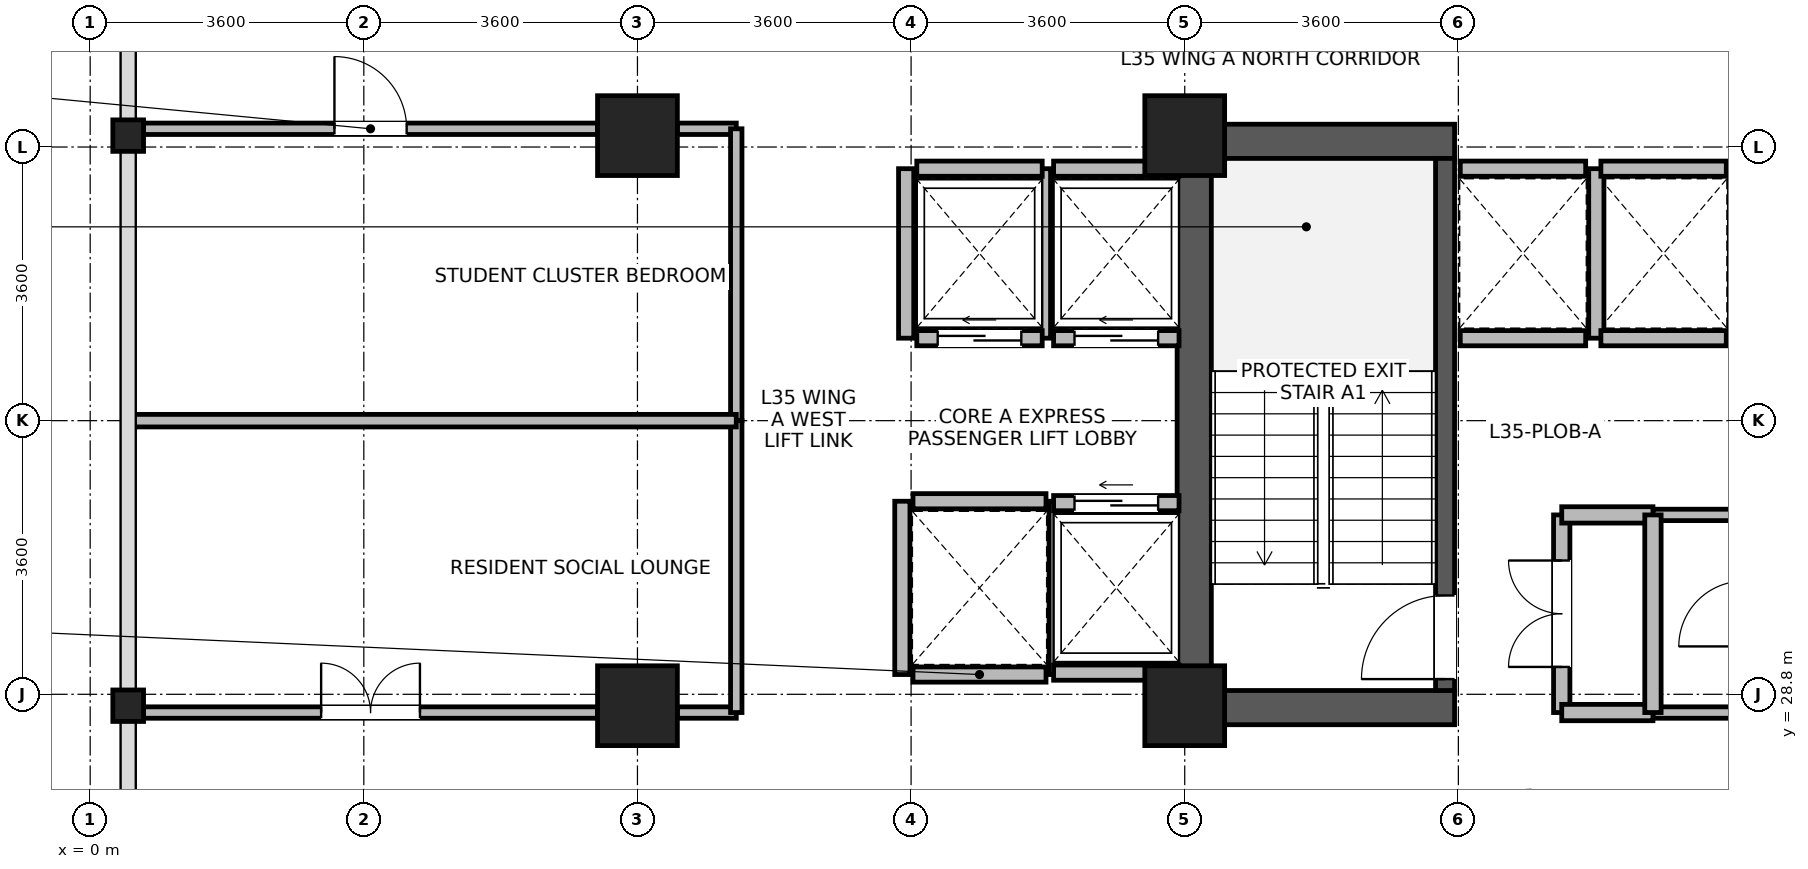
"""IFC4 building model, lengths in metres.
Left out: names, types, materials, properties, quantities, classifications, styles, units other than length and angle.
Written with IfcOpenShell. Run it as: python <this file> out.ifc"""

import sys

from ifc_helpers import new_model, si_unit, direction, frame, frame_2d, origin, origin_2d, place, context, subcontext, project, spatial, rectangle, i_section, extrude, source, transform, mapped, element, fill, save


model = new_model("IFC4")
c1 = context("Model", 3, precision=1e-05, world=origin(), true_north=direction((0.0, 1.0)))
c2 = subcontext(c1, "Body", "Model", "MODEL_VIEW")
j1 = project(units=[si_unit("LENGTHUNIT", "METRE"), si_unit("PLANEANGLEUNIT", "RADIAN")], contexts=[c1])
p1 = place(None, origin())
s1 = spatial("IfcSite", under=j1, at=p1, CompositionType="ELEMENT")
p2 = place(p1, origin())
s2 = spatial("IfcBuilding", under=s1, at=p2, CompositionType="ELEMENT")
p3 = place(p2, frame((0.0, 0.0, 140.2)))
s3 = spatial("IfcBuildingStorey", under=s2, at=p3, CompositionType="ELEMENT", Elevation=140.2)
p4 = place(p3, frame((14.525, 28.4, 0.0), z_axis=(0.0, 0.0, 1.0), x_axis=(0.0, 1.0, 0.0)))
e1 = element("IfcWall", 1, at=p4, inside=s3, PredefinedType="SHEAR", context=c2, shape_type="SweptSolid", body=[
    extrude(rectangle(XDim=7.9, YDim=0.45, at=frame_2d((3.95, 0.0))), origin(), (0.0, 0.0, 1.0), 3.46),
])
for number, where, z_axis, x_axis in (
    (2, (14.75, 28.625, 0.0), (0.0, 0.0, 1.0), (1.0, 0.0, 0.0)),
    (3, (14.75, 36.075, 0.0), (0.0, 0.0, 1.0), (1.0, 0.0, 0.0)),
):
    element("IfcWall", number, at=place(p3, frame(where, z_axis=z_axis, x_axis=x_axis)), inside=s3, PredefinedType="SHEAR", context=c2, shape_type="SweptSolid", body=[
        extrude(rectangle(XDim=3.2, YDim=0.45, at=frame_2d((1.6, 0.0))), origin(), (0.0, 0.0, 1.0), 3.46),
    ])
p5 = place(p3, frame((17.825, 28.85, 0.0), z_axis=(0.0, 0.0, 1.0), x_axis=(0.0, 1.0, 0.0)))
e4 = element("IfcWall", 4, at=p5, inside=s3, PredefinedType="SHEAR", context=c2, shape_type="SweptSolid", body=[
    extrude(rectangle(XDim=7.0, YDim=0.25, at=frame_2d((3.5, 0.0))), origin(), (0.0, 0.0, 1.0), 3.46),
])
p6 = place(p5, frame((0.15, 0.0, 0.0)))
e5 = element("IfcOpeningElement", 5, at=p6, cuts=e4, PredefinedType="OPENING", context=c2, shape_type="SweptSolid", body=[
    extrude(rectangle(XDim=1.1, YDim=2.08, at=frame_2d((0.55, 1.04))), frame((0.0, 0.135, 0.0), z_axis=(0.0, -1.0, 0.0), x_axis=(1.0, 0.0, 0.0)), (0.0, 0.0, 1.0), 0.27),
])
m1 = source(origin(), c2, "Body", "SweptSolid", [
    extrude(rectangle(XDim=1.05, YDim=1.05, at=origin_2d()), origin(), (0.0, 0.0, 1.0), 3.7),
])
for number, where, z_axis, x_axis in (
    (6, (7.2, 28.65, 0.0), (0.0, 0.0, 1.0), (1.0, 0.0, 0.0)),
    (7, (7.2, 36.15, 0.0), (0.0, 0.0, 1.0), (1.0, 0.0, 0.0)),
    (8, (14.4, 28.65, 0.0), (0.0, 0.0, 1.0), (1.0, 0.0, 0.0)),
    (9, (14.4, 36.15, 0.0), (0.0, 0.0, 1.0), (1.0, 0.0, 0.0)),
):
    element("IfcColumn", number, at=place(p3, frame(where, z_axis=z_axis, x_axis=x_axis)), inside=s3, PredefinedType="COLUMN", context=c2, shape_type="MappedRepresentation", body=[
        mapped(m1, transform((0.0, 0.0, 0.0), x_axis=(1.0, 0.0, 0.0), y_axis=(0.0, 1.0, 0.0), z_axis=(0.0, 0.0, 1.0), scale=1.0)),
    ])
m2 = source(origin(), c2, "Body", "SweptSolid", [
    extrude(i_section(OverallWidth=0.404, OverallDepth=0.414, WebThickness=0.021, FlangeThickness=0.028, FilletRadius=0.015, at=origin_2d()), origin(), (0.0, 0.0, 1.0), 3.7),
])
for number, where, z_axis, x_axis in (
    (10, (0.5, 28.65, 0.0), (0.0, 0.0, 1.0), (1.0, 0.0, 0.0)),
    (11, (0.5, 36.15, 0.0), (0.0, 0.0, 1.0), (1.0, 0.0, 0.0)),
):
    element("IfcColumn", number, at=place(p3, frame(where, z_axis=z_axis, x_axis=x_axis)), inside=s3, PredefinedType="COLUMN", context=c2, shape_type="MappedRepresentation", body=[
        mapped(m2, transform((0.0, 0.0, 0.0), x_axis=(1.0, 0.0, 0.0), y_axis=(0.0, 1.0, 0.0), z_axis=(0.0, 0.0, 1.0), scale=1.0)),
    ])
p7 = place(p3, frame((18.025, 33.485, 0.0), z_axis=(0.0, 0.0, 1.0), x_axis=(1.0, 0.0, 0.0)))
e12 = element("IfcWall", 12, at=p7, inside=s3, PredefinedType="PARTITIONING", context=c2, shape_type="SweptSolid", body=[
    extrude(rectangle(XDim=1.65, YDim=0.2, at=frame_2d((0.825, 0.0))), origin(), (0.0, 0.0, 1.0), 3.44),
])
p8 = place(p3, frame((18.025, 35.715, 0.0), z_axis=(0.0, 0.0, 1.0), x_axis=(1.0, 0.0, 0.0)))
e13 = element("IfcWall", 13, at=p8, inside=s3, PredefinedType="PARTITIONING", context=c2, shape_type="SweptSolid", body=[
    extrude(rectangle(XDim=1.65, YDim=0.2, at=frame_2d((0.825, 0.0))), origin(), (0.0, 0.0, 1.0), 2.44),
])
p9 = place(p3, frame((19.815, 33.485, 0.0), z_axis=(0.0, 0.0, 1.0), x_axis=(0.0, 1.0, 0.0)))
e14 = element("IfcWall", 14, at=p9, inside=s3, PredefinedType="PARTITIONING", context=c2, shape_type="SweptSolid", body=[
    extrude(rectangle(XDim=2.23, YDim=0.2, at=frame_2d((1.115, 0.0))), origin(), (0.0, 0.0, 1.0), 3.44),
])
p10 = place(p3, frame((19.875, 33.485, 0.0), z_axis=(0.0, 0.0, 1.0), x_axis=(1.0, 0.0, 0.0)))
e15 = element("IfcWall", 15, at=p10, inside=s3, PredefinedType="PARTITIONING", context=c2, shape_type="SweptSolid", body=[
    extrude(rectangle(XDim=1.65, YDim=0.2, at=frame_2d((0.825, 0.0))), origin(), (0.0, 0.0, 1.0), 3.44),
])
p11 = place(p3, frame((19.875, 35.715, 0.0), z_axis=(0.0, 0.0, 1.0), x_axis=(1.0, 0.0, 0.0)))
e16 = element("IfcWall", 16, at=p11, inside=s3, PredefinedType="PARTITIONING", context=c2, shape_type="SweptSolid", body=[
    extrude(rectangle(XDim=1.65, YDim=0.2, at=frame_2d((0.825, 0.0))), origin(), (0.0, 0.0, 1.0), 2.44),
])
for number, where, z_axis, x_axis in (
    (17, (10.825, 29.06, 0.0), (0.0, 0.0, 1.0), (1.0, 0.0, 0.0)),
    (18, (10.825, 31.34, 0.0), (0.0, 0.0, 1.0), (1.0, 0.0, 0.0)),
):
    element("IfcWall", number, at=place(p3, frame(where, z_axis=z_axis, x_axis=x_axis)), inside=s3, PredefinedType="PARTITIONING", context=c2, shape_type="SweptSolid", body=[
        extrude(rectangle(XDim=1.75, YDim=0.2, at=frame_2d((0.875, 0.0))), origin(), (0.0, 0.0, 1.0), 3.44),
    ])
for number, where, z_axis, x_axis in (
    (19, (10.685, 29.06, 0.0), (0.0, 0.0, 1.0), (0.0, 1.0, 0.0)),
    (20, (12.715, 29.06, 0.0), (0.0, 0.0, 1.0), (0.0, 1.0, 0.0)),
):
    element("IfcWall", number, at=place(p3, frame(where, z_axis=z_axis, x_axis=x_axis)), inside=s3, PredefinedType="PARTITIONING", context=c2, shape_type="SweptSolid", body=[
        extrude(rectangle(XDim=2.28, YDim=0.2, at=frame_2d((1.14, 0.0))), origin(), (0.0, 0.0, 1.0), 3.44),
    ])
p12 = place(p3, frame((12.675, 33.485, 0.0), z_axis=(0.0, 0.0, 1.0), x_axis=(1.0, 0.0, 0.0)))
e21 = element("IfcWall", 21, at=p12, inside=s3, PredefinedType="PARTITIONING", context=c2, shape_type="SweptSolid", body=[
    extrude(rectangle(XDim=1.65, YDim=0.2, at=frame_2d((0.825, 0.0))), origin(), (0.0, 0.0, 1.0), 3.44),
])
p13 = place(p12, frame((0.275, 0.0, 0.0)))
e22 = element("IfcOpeningElement", 22, at=p13, cuts=e21, PredefinedType="OPENING", context=c2, shape_type="SweptSolid", body=[
    extrude(rectangle(XDim=1.1, YDim=2.12, at=frame_2d((0.55, 1.06))), frame((0.0, 0.11, 0.0), z_axis=(0.0, -1.0, 0.0), x_axis=(1.0, 0.0, 0.0)), (0.0, 0.0, 1.0), 0.22),
])
p14 = place(p3, frame((12.675, 35.715, 0.0), z_axis=(0.0, 0.0, 1.0), x_axis=(1.0, 0.0, 0.0)))
e23 = element("IfcWall", 23, at=p14, inside=s3, PredefinedType="PARTITIONING", context=c2, shape_type="SweptSolid", body=[
    extrude(rectangle(XDim=1.65, YDim=0.2, at=frame_2d((0.825, 0.0))), origin(), (0.0, 0.0, 1.0), 3.44),
])
p15 = place(p3, frame((12.535, 33.485, 0.0), z_axis=(0.0, 0.0, 1.0), x_axis=(0.0, 1.0, 0.0)))
e24 = element("IfcWall", 24, at=p15, inside=s3, PredefinedType="PARTITIONING", context=c2, shape_type="SweptSolid", body=[
    extrude(rectangle(XDim=2.23, YDim=0.2, at=frame_2d((1.115, 0.0))), origin(), (0.0, 0.0, 1.0), 3.44),
])
p16 = place(p3, frame((12.675, 29.085, 0.0), z_axis=(0.0, 0.0, 1.0), x_axis=(1.0, 0.0, 0.0)))
e25 = element("IfcWall", 25, at=p16, inside=s3, PredefinedType="PARTITIONING", context=c2, shape_type="SweptSolid", body=[
    extrude(rectangle(XDim=1.65, YDim=0.2, at=frame_2d((0.825, 0.0))), origin(), (0.0, 0.0, 1.0), 3.44),
])
p17 = place(p3, frame((12.675, 31.315, 0.0), z_axis=(0.0, 0.0, 1.0), x_axis=(1.0, 0.0, 0.0)))
e26 = element("IfcWall", 26, at=p17, inside=s3, PredefinedType="PARTITIONING", context=c2, shape_type="SweptSolid", body=[
    extrude(rectangle(XDim=1.65, YDim=0.2, at=frame_2d((0.825, 0.0))), origin(), (0.0, 0.0, 1.0), 3.44),
])
p18 = place(p17, frame((0.275, 0.0, 0.0)))
e27 = element("IfcOpeningElement", 27, at=p18, cuts=e26, PredefinedType="OPENING", context=c2, shape_type="SweptSolid", body=[
    extrude(rectangle(XDim=1.1, YDim=2.12, at=frame_2d((0.55, 1.06))), frame((0.0, 0.11, 0.0), z_axis=(0.0, -1.0, 0.0), x_axis=(1.0, 0.0, 0.0)), (0.0, 0.0, 1.0), 0.22),
])
p19 = place(p3, frame((10.875, 33.485, 0.0), z_axis=(0.0, 0.0, 1.0), x_axis=(1.0, 0.0, 0.0)))
e28 = element("IfcWall", 28, at=p19, inside=s3, PredefinedType="PARTITIONING", context=c2, shape_type="SweptSolid", body=[
    extrude(rectangle(XDim=1.65, YDim=0.2, at=frame_2d((0.825, 0.0))), origin(), (0.0, 0.0, 1.0), 3.44),
])
p20 = place(p19, frame((0.275, 0.0, 0.0)))
e29 = element("IfcOpeningElement", 29, at=p20, cuts=e28, PredefinedType="OPENING", context=c2, shape_type="SweptSolid", body=[
    extrude(rectangle(XDim=1.1, YDim=2.12, at=frame_2d((0.55, 1.06))), frame((0.0, 0.11, 0.0), z_axis=(0.0, -1.0, 0.0), x_axis=(1.0, 0.0, 0.0)), (0.0, 0.0, 1.0), 0.22),
])
p21 = place(p3, frame((10.875, 35.715, 0.0), z_axis=(0.0, 0.0, 1.0), x_axis=(1.0, 0.0, 0.0)))
e30 = element("IfcWall", 30, at=p21, inside=s3, PredefinedType="PARTITIONING", context=c2, shape_type="SweptSolid", body=[
    extrude(rectangle(XDim=1.65, YDim=0.2, at=frame_2d((0.825, 0.0))), origin(), (0.0, 0.0, 1.0), 3.44),
])
p22 = place(p3, frame((10.735, 33.485, 0.0), z_axis=(0.0, 0.0, 1.0), x_axis=(0.0, 1.0, 0.0)))
e31 = element("IfcWall", 31, at=p22, inside=s3, PredefinedType="PARTITIONING", context=c2, shape_type="SweptSolid", body=[
    extrude(rectangle(XDim=2.23, YDim=0.2, at=frame_2d((1.115, 0.0))), origin(), (0.0, 0.0, 1.0), 3.44),
])
p23 = place(p3, frame((0.702, 28.56, 0.0), z_axis=(0.0, 0.0, 1.0), x_axis=(1.0, 0.0, 0.0)))
e32 = element("IfcWall", 32, at=p23, inside=s3, PredefinedType="PARTITIONING", context=c2, shape_type="SweptSolid", body=[
    extrude(rectangle(XDim=5.973, YDim=0.15, at=frame_2d((2.987, 0.0))), origin(), (0.0, 0.0, 1.0), 2.84),
])
p24 = place(p23, frame((2.336, 0.0, 0.0)))
e33 = element("IfcOpeningElement", 33, at=p24, cuts=e32, PredefinedType="OPENING", context=c2, shape_type="SweptSolid", body=[
    extrude(rectangle(XDim=1.3, YDim=2.12, at=frame_2d((0.65, 1.06))), frame((0.0, 0.085, 0.0), z_axis=(0.0, -1.0, 0.0), x_axis=(1.0, 0.0, 0.0)), (0.0, 0.0, 1.0), 0.17),
])
p25 = place(p3, frame((7.725, 28.56, 0.0), z_axis=(0.0, 0.0, 1.0), x_axis=(1.0, 0.0, 0.0)))
e34 = element("IfcWall", 34, at=p25, inside=s3, PredefinedType="PARTITIONING", context=c2, shape_type="SweptSolid", body=[
    extrude(rectangle(XDim=0.775, YDim=0.15, at=frame_2d((0.387, 0.0))), origin(), (0.0, 0.0, 1.0), 2.84),
])
p26 = place(p3, frame((0.702, 36.24, 0.0), z_axis=(0.0, 0.0, 1.0), x_axis=(1.0, 0.0, 0.0)))
e35 = element("IfcWall", 35, at=p26, inside=s3, PredefinedType="PARTITIONING", context=c2, shape_type="SweptSolid", body=[
    extrude(rectangle(XDim=5.973, YDim=0.15, at=frame_2d((2.987, 0.0))), origin(), (0.0, 0.0, 1.0), 2.84),
])
p27 = place(p26, frame((2.511, 0.0, 0.0)))
e36 = element("IfcOpeningElement", 36, at=p27, cuts=e35, PredefinedType="OPENING", context=c2, shape_type="SweptSolid", body=[
    extrude(rectangle(XDim=0.95, YDim=2.1, at=frame_2d((0.475, 1.05))), frame((0.0, 0.085, 0.0), z_axis=(0.0, -1.0, 0.0), x_axis=(1.0, 0.0, 0.0)), (0.0, 0.0, 1.0), 0.17),
])
p28 = place(p3, frame((7.725, 36.24, 0.0), z_axis=(0.0, 0.0, 1.0), x_axis=(1.0, 0.0, 0.0)))
e37 = element("IfcWall", 37, at=p28, inside=s3, PredefinedType="PARTITIONING", context=c2, shape_type="SweptSolid", body=[
    extrude(rectangle(XDim=0.775, YDim=0.15, at=frame_2d((0.387, 0.0))), origin(), (0.0, 0.0, 1.0), 2.84),
])
p29 = place(p3, frame((8.5, 32.4, 0.0), z_axis=(0.0, 0.0, 1.0), x_axis=(0.0, 1.0, 0.0)))
e38 = element("IfcWall", 38, at=p29, inside=s3, PredefinedType="PARTITIONING", context=c2, shape_type="SweptSolid", body=[
    extrude(rectangle(XDim=3.84, YDim=0.15, at=frame_2d((1.92, 0.0))), origin(), (0.0, 0.0, 1.0), 3.44),
])
p30 = place(p3, frame((8.5, 28.56, 0.0), z_axis=(0.0, 0.0, 1.0), x_axis=(0.0, 1.0, 0.0)))
e39 = element("IfcWall", 39, at=p30, inside=s3, PredefinedType="PARTITIONING", context=c2, shape_type="SweptSolid", body=[
    extrude(rectangle(XDim=3.84, YDim=0.15, at=frame_2d((1.92, 0.0))), origin(), (0.0, 0.0, 1.0), 3.44),
])
p31 = place(p3, frame((19.36, 28.56, 0.0), z_axis=(0.0, 0.0, 1.0), x_axis=(0.0, 1.0, 0.0)))
e40 = element("IfcWall", 40, at=p31, inside=s3, PredefinedType="PARTITIONING", context=c2, shape_type="SweptSolid", body=[
    extrude(rectangle(XDim=2.6, YDim=0.215, at=frame_2d((1.3, 0.0))), origin(), (0.0, 0.0, 1.0), 3.44),
])
p32 = place(p31, frame((0.6, 0.0, 0.0)))
e41 = element("IfcOpeningElement", 41, at=p32, cuts=e40, PredefinedType="OPENING", context=c2, shape_type="SweptSolid", body=[
    extrude(rectangle(XDim=1.4, YDim=2.15, at=frame_2d((0.7, 1.075))), frame((0.0, 0.118, 0.0), z_axis=(0.0, -1.0, 0.0), x_axis=(1.0, 0.0, 0.0)), (0.0, 0.0, 1.0), 0.235),
])
p33 = place(p3, frame((20.56, 28.56, 0.0), z_axis=(0.0, 0.0, 1.0), x_axis=(1.0, 0.0, 0.0)))
e42 = element("IfcWall", 42, at=p33, inside=s3, PredefinedType="PARTITIONING", context=c2, shape_type="SweptSolid", body=[
    extrude(rectangle(XDim=1.2, YDim=0.15, at=frame_2d((0.6, 0.0))), origin(), (0.0, 0.0, 1.0), 2.44),
])
p34 = place(p3, frame((20.56, 31.16, 0.0), z_axis=(0.0, 0.0, 1.0), x_axis=(1.0, 0.0, 0.0)))
e43 = element("IfcWall", 43, at=p34, inside=s3, PredefinedType="PARTITIONING", context=c2, shape_type="SweptSolid", body=[
    extrude(rectangle(XDim=1.2, YDim=0.15, at=frame_2d((0.6, 0.0))), origin(), (0.0, 0.0, 1.0), 3.44),
])
p35 = place(p3, frame((19.36, 28.56, 0.0), z_axis=(0.0, 0.0, 1.0), x_axis=(1.0, 0.0, 0.0)))
e44 = element("IfcWall", 44, at=p35, inside=s3, PredefinedType="PARTITIONING", context=c2, shape_type="SweptSolid", body=[
    extrude(rectangle(XDim=1.2, YDim=0.215, at=frame_2d((0.6, 0.0))), origin(), (0.0, 0.0, 1.0), 2.44),
])
p36 = place(p3, frame((19.36, 31.16, 0.0), z_axis=(0.0, 0.0, 1.0), x_axis=(1.0, 0.0, 0.0)))
e45 = element("IfcWall", 45, at=p36, inside=s3, PredefinedType="PARTITIONING", context=c2, shape_type="SweptSolid", body=[
    extrude(rectangle(XDim=1.2, YDim=0.215, at=frame_2d((0.6, 0.0))), origin(), (0.0, 0.0, 1.0), 3.44),
])
p37 = place(p3, frame((0.52, 32.4, 0.0), z_axis=(0.0, 0.0, 1.0), x_axis=(1.0, 0.0, 0.0)))
e46 = element("IfcWall", 46, at=p37, inside=s3, PredefinedType="PARTITIONING", context=c2, shape_type="SweptSolid", body=[
    extrude(rectangle(XDim=7.98, YDim=0.165, at=frame_2d((3.99, 0.0))), origin(), (0.0, 0.0, 1.0), 3.44),
])
p38 = place(p3, frame((20.56, 28.56, 0.0), z_axis=(0.0, 0.0, 1.0), x_axis=(0.0, 1.0, 0.0)))
e47 = element("IfcWall", 47, at=p38, inside=s3, PredefinedType="PARTITIONING", context=c2, shape_type="SweptSolid", body=[
    extrude(rectangle(XDim=2.6, YDim=0.215, at=frame_2d((1.3, 0.0))), origin(), (0.0, 0.0, 1.0), 3.44),
])
p39 = place(p6, origin())
e48 = element("IfcDoor", 48, at=p39, inside=s3, OperationType="SINGLE_SWING_LEFT", PredefinedType="DOOR", context=c2, shape_type="SweptSolid", body=[
    extrude(rectangle(XDim=1.1, YDim=2.08, at=frame_2d((0.55, 1.04))), frame((0.0, 0.025, 0.0), z_axis=(0.0, -1.0, 0.0), x_axis=(1.0, 0.0, 0.0)), (0.0, 0.0, 1.0), 0.05),
])
fill(e5, e48)
p40 = place(p13, origin())
e49 = element("IfcDoor", 49, at=p40, inside=s3, OperationType="SLIDING_TO_LEFT", PredefinedType="DOOR", context=c2, shape_type="SweptSolid", body=[
    extrude(rectangle(XDim=1.1, YDim=2.12, at=frame_2d((0.55, 1.06))), frame((0.0, 0.025, 0.0), z_axis=(0.0, -1.0, 0.0), x_axis=(1.0, 0.0, 0.0)), (0.0, 0.0, 1.0), 0.05),
])
fill(e22, e49)
p41 = place(p18, origin())
e50 = element("IfcDoor", 50, at=p41, inside=s3, OperationType="SLIDING_TO_LEFT", PredefinedType="DOOR", context=c2, shape_type="SweptSolid", body=[
    extrude(rectangle(XDim=1.1, YDim=2.12, at=frame_2d((0.55, 1.06))), frame((0.0, 0.025, 0.0), z_axis=(0.0, -1.0, 0.0), x_axis=(1.0, 0.0, 0.0)), (0.0, 0.0, 1.0), 0.05),
])
fill(e27, e50)
p42 = place(p20, origin())
e51 = element("IfcDoor", 51, at=p42, inside=s3, OperationType="SLIDING_TO_LEFT", PredefinedType="DOOR", context=c2, shape_type="SweptSolid", body=[
    extrude(rectangle(XDim=1.1, YDim=2.12, at=frame_2d((0.55, 1.06))), frame((0.0, 0.025, 0.0), z_axis=(0.0, -1.0, 0.0), x_axis=(1.0, 0.0, 0.0)), (0.0, 0.0, 1.0), 0.05),
])
fill(e29, e51)
p43 = place(p24, origin())
e52 = element("IfcDoor", 52, at=p43, inside=s3, OperationType="DOUBLE_DOOR_SINGLE_SWING", PredefinedType="DOOR", context=c2, shape_type="SweptSolid", body=[
    extrude(rectangle(XDim=1.3, YDim=2.12, at=frame_2d((0.65, 1.06))), frame((0.0, 0.025, 0.0), z_axis=(0.0, -1.0, 0.0), x_axis=(1.0, 0.0, 0.0)), (0.0, 0.0, 1.0), 0.05),
])
fill(e33, e52)
p44 = place(p27, origin())
e53 = element("IfcDoor", 53, at=p44, inside=s3, OperationType="SINGLE_SWING_LEFT", PredefinedType="DOOR", context=c2, shape_type="SweptSolid", body=[
    extrude(rectangle(XDim=0.95, YDim=2.1, at=frame_2d((0.475, 1.05))), frame((0.0, 0.025, 0.0), z_axis=(0.0, -1.0, 0.0), x_axis=(1.0, 0.0, 0.0)), (0.0, 0.0, 1.0), 0.05),
])
fill(e36, e53)
p45 = place(p32, origin())
e54 = element("IfcDoor", 54, at=p45, inside=s3, OperationType="DOUBLE_DOOR_SINGLE_SWING", PredefinedType="DOOR", context=c2, shape_type="SweptSolid", body=[
    extrude(rectangle(XDim=1.4, YDim=2.15, at=frame_2d((0.7, 1.075))), frame((0.0, 0.025, 0.0), z_axis=(0.0, -1.0, 0.0), x_axis=(1.0, 0.0, 0.0)), (0.0, 0.0, 1.0), 0.05),
])
fill(e41, e54)
save(model, sys.argv[1])
